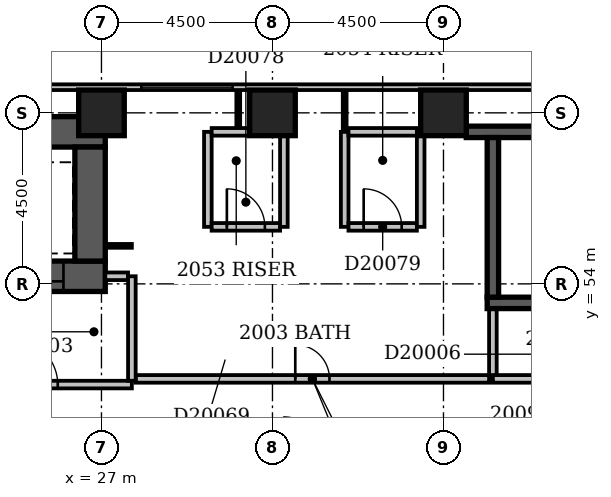
"""IFC4 building model, lengths in metres.
Left out: names, types, materials, properties, quantities, classifications, styles, units other than length and angle.
Written with IfcOpenShell. Run it as: python <this file> out.ifc"""

import sys

from ifc_helpers import new_model, si_unit, direction, frame, frame_2d, origin, origin_2d, place, context, subcontext, project, spatial, rectangle, extrude, element, fill, save


model = new_model("IFC4")
c1 = context("Model", 3, precision=1e-05, world=origin(), true_north=direction((0.0, 1.0)))
c2 = subcontext(c1, "Body", "Model", "MODEL_VIEW")
j1 = project(units=[si_unit("LENGTHUNIT", "METRE"), si_unit("PLANEANGLEUNIT", "RADIAN")], contexts=[c1])
p1 = place(None, origin())
s1 = spatial("IfcSite", under=j1, at=p1, CompositionType="ELEMENT")
p2 = place(p1, origin())
s2 = spatial("IfcBuilding", under=s1, at=p2, CompositionType="ELEMENT")
p3 = place(p2, frame((0.0, 0.0, 83.0)))
s3 = spatial("IfcBuildingStorey", under=s2, at=p3, CompositionType="ELEMENT", Elevation=83.0)
p4 = place(p3, frame((23.8, 54.2, -0.3), z_axis=(0.0, 0.0, 1.0), x_axis=(1.0, 0.0, 0.0)))
e1 = element("IfcWall", 1, at=p4, inside=s3, PredefinedType="SHEAR", context=c2, shape_type="SweptSolid", body=[
    extrude(rectangle(XDim=3.3, YDim=0.8, at=frame_2d((1.65, 0.0))), origin(), (0.0, 0.0, 1.0), 3.6),
])
p5 = place(p4, frame((1.1, 0.0, 0.3)))
e2 = element("IfcOpeningElement", 2, at=p5, cuts=e1, PredefinedType="OPENING", context=c2, shape_type="SweptSolid", body=[
    extrude(rectangle(XDim=1.1, YDim=2.1, at=frame_2d((0.55, 1.05))), frame((0.0, 0.412, 0.0), z_axis=(0.0, -1.0, 0.0), x_axis=(1.0, 0.0, 0.0)), (0.0, 0.0, 1.0), 0.824),
])
p6 = place(p3, frame((23.8, 58.0, -0.3), z_axis=(0.0, 0.0, 1.0), x_axis=(1.0, 0.0, 0.0)))
e3 = element("IfcWall", 3, at=p6, inside=s3, PredefinedType="SHEAR", context=c2, shape_type="SweptSolid", body=[
    extrude(rectangle(XDim=3.3, YDim=0.8, at=frame_2d((1.65, 0.0))), origin(), (0.0, 0.0, 1.0), 3.6),
])
p7 = place(p3, frame((26.7, 54.6, -0.3), z_axis=(0.0, 0.0, 1.0), x_axis=(0.0, 1.0, 0.0)))
e4 = element("IfcWall", 4, at=p7, inside=s3, PredefinedType="SHEAR", context=c2, shape_type="SweptSolid", body=[
    extrude(rectangle(XDim=3.0, YDim=0.8, at=frame_2d((1.5, 0.0))), origin(), (0.0, 0.0, 1.0), 3.6),
])
p8 = place(p3, frame((36.6, 58.0, -0.3), z_axis=(0.0, 0.0, 1.0), x_axis=(1.0, 0.0, 0.0)))
e5 = element("IfcWall", 5, at=p8, inside=s3, PredefinedType="SHEAR", context=c2, shape_type="SweptSolid", body=[
    extrude(rectangle(XDim=7.8, YDim=0.3, at=frame_2d((3.9, 0.0))), origin(), (0.0, 0.0, 1.0), 3.6),
])
p9 = place(p3, frame((37.15, 53.5, -0.3), z_axis=(0.0, 0.0, 1.0), x_axis=(1.0, 0.0, 0.0)))
e6 = element("IfcWall", 6, at=p9, inside=s3, PredefinedType="SHEAR", context=c2, shape_type="SweptSolid", body=[
    extrude(rectangle(XDim=7.0, YDim=0.3, at=frame_2d((3.5, 0.0))), origin(), (0.0, 0.0, 1.0), 3.6),
])
p10 = place(p9, frame((5.58, 0.0, 0.3)))
e7 = element("IfcOpeningElement", 7, at=p10, cuts=e6, PredefinedType="OPENING", context=c2, shape_type="SweptSolid", body=[
    extrude(rectangle(XDim=1.1, YDim=2.1, at=frame_2d((0.55, 1.05))), frame((0.0, 0.162, 0.0), z_axis=(0.0, -1.0, 0.0), x_axis=(1.0, 0.0, 0.0)), (0.0, 0.0, 1.0), 0.324),
])
p11 = place(p3, frame((37.3, 53.65, -0.3), z_axis=(0.0, 0.0, 1.0), x_axis=(0.0, 1.0, 0.0)))
e8 = element("IfcWall", 8, at=p11, inside=s3, PredefinedType="SHEAR", context=c2, shape_type="SweptSolid", body=[
    extrude(rectangle(XDim=4.2, YDim=0.3, at=frame_2d((2.1, 0.0))), origin(), (0.0, 0.0, 1.0), 3.6),
])
for number, where, z_axis, x_axis in (
    (9, (27.0, 58.5, -0.3), (0.0, 0.0, 1.0), (1.0, 0.0, 0.0)),
    (10, (31.5, 58.5, -0.3), (0.0, 0.0, 1.0), (1.0, 0.0, 0.0)),
    (11, (36.0, 58.5, -0.3), (0.0, 0.0, 1.0), (1.0, 0.0, 0.0)),
):
    element("IfcColumn", number, at=place(p3, frame(where, z_axis=z_axis, x_axis=x_axis)), inside=s3, PredefinedType="COLUMN", context=c2, shape_type="SweptSolid", body=[
        extrude(rectangle(XDim=1.2, YDim=1.2, at=origin_2d()), origin(), (0.0, 0.0, 1.0), 3.6),
    ])
p12 = place(p3, frame((68.1, 59.175, 0.0), z_axis=(0.0, 0.0, 1.0), x_axis=(-1.0, 0.0, 0.0)))
e12 = element("IfcWall", 12, at=p12, inside=s3, PredefinedType="STANDARD", context=c2, shape_type="SweptSolid", body=[
    extrude(rectangle(XDim=68.85, YDim=0.15, at=frame_2d((34.425, 0.0))), origin(), (0.0, 0.0, 1.0), 2.7),
])
p13 = place(p12, frame((37.65, 0.0, 0.6)))
e13 = element("IfcOpeningElement", 13, at=p13, cuts=e12, PredefinedType="OPENING", context=c2, shape_type="SweptSolid", body=[
    extrude(rectangle(XDim=2.4, YDim=1.8, at=frame_2d((1.2, 0.9))), frame((0.0, 0.087, 0.0), z_axis=(0.0, -1.0, 0.0), x_axis=(1.0, 0.0, 0.0)), (0.0, 0.0, 1.0), 0.174),
])
p14 = place(p3, frame((23.0, 51.35, 0.0), z_axis=(0.0, 0.0, 1.0), x_axis=(1.0, 0.0, 0.0)))
e14 = element("IfcWall", 14, at=p14, inside=s3, PredefinedType="PARTITIONING", context=c2, shape_type="SweptSolid", body=[
    extrude(rectangle(XDim=4.8, YDim=0.2, at=frame_2d((2.4, 0.0))), origin(), (0.0, 0.0, 1.0), 3.3),
])
p15 = place(p14, frame((1.65, 0.0, 0.0)))
e15 = element("IfcOpeningElement", 15, at=p15, cuts=e14, PredefinedType="OPENING", context=c2, shape_type="SweptSolid", body=[
    extrude(rectangle(XDim=1.2, YDim=2.1, at=frame_2d((0.6, 1.05))), frame((0.0, 0.112, 0.0), z_axis=(0.0, -1.0, 0.0), x_axis=(1.0, 0.0, 0.0)), (0.0, 0.0, 1.0), 0.224),
])
p16 = place(p3, frame((27.8, 51.45, 0.0), z_axis=(0.0, 0.0, 1.0), x_axis=(0.0, 1.0, 0.0)))
e16 = element("IfcWall", 16, at=p16, inside=s3, PredefinedType="PARTITIONING", context=c2, shape_type="SweptSolid", body=[
    extrude(rectangle(XDim=2.75, YDim=0.2, at=frame_2d((1.375, 0.0))), origin(), (0.0, 0.0, 1.0), 3.3),
])
p17 = place(p3, frame((27.1, 54.2, 0.0), z_axis=(0.0, 0.0, 1.0), x_axis=(1.0, 0.0, 0.0)))
e17 = element("IfcWall", 17, at=p17, inside=s3, PredefinedType="PARTITIONING", context=c2, shape_type="SweptSolid", body=[
    extrude(rectangle(XDim=0.6, YDim=0.2, at=frame_2d((0.3, 0.0))), origin(), (0.0, 0.0, 1.0), 3.3),
])
p18 = place(p3, frame((37.3, 51.5, 0.0), z_axis=(0.0, 0.0, 1.0), x_axis=(1.0, 0.0, 0.0)))
e18 = element("IfcWall", 18, at=p18, inside=s3, PredefinedType="PARTITIONING", context=c2, shape_type="SweptSolid", body=[
    extrude(rectangle(XDim=6.7, YDim=0.2, at=frame_2d((3.35, 0.0))), origin(), (0.0, 0.0, 1.0), 3.3),
])
p19 = place(p18, frame((2.75, 0.0, 0.0)))
e19 = element("IfcOpeningElement", 19, at=p19, cuts=e18, PredefinedType="OPENING", context=c2, shape_type="SweptSolid", body=[
    extrude(rectangle(XDim=1.2, YDim=2.1, at=frame_2d((0.6, 1.05))), frame((0.0, 0.112, 0.0), z_axis=(0.0, -1.0, 0.0), x_axis=(1.0, 0.0, 0.0)), (0.0, 0.0, 1.0), 0.224),
])
p20 = place(p3, frame((37.3, 51.6, 0.0), z_axis=(0.0, 0.0, 1.0), x_axis=(0.0, 1.0, 0.0)))
e20 = element("IfcWall", 20, at=p20, inside=s3, PredefinedType="PARTITIONING", context=c2, shape_type="SweptSolid", body=[
    extrude(rectangle(XDim=1.73, YDim=0.2, at=frame_2d((0.865, 0.0))), origin(), (0.0, 0.0, 1.0), 3.3),
])
p21 = place(p3, frame((27.9, 51.5, 0.0), z_axis=(0.0, 0.0, 1.0), x_axis=(1.0, 0.0, 0.0)))
e21 = element("IfcWall", 21, at=p21, inside=s3, PredefinedType="PARTITIONING", context=c2, shape_type="SweptSolid", body=[
    extrude(rectangle(XDim=9.3, YDim=0.2, at=frame_2d((4.65, 0.0))), origin(), (0.0, 0.0, 1.0), 3.3),
])
p22 = place(p21, frame((4.2, 0.0, 0.0)))
e22 = element("IfcOpeningElement", 22, at=p22, cuts=e21, PredefinedType="OPENING", context=c2, shape_type="SweptSolid", body=[
    extrude(rectangle(XDim=0.9, YDim=2.1, at=frame_2d((0.45, 1.05))), frame((0.0, 0.112, 0.0), z_axis=(0.0, -1.0, 0.0), x_axis=(1.0, 0.0, 0.0)), (0.0, 0.0, 1.0), 0.224),
])
p23 = place(p3, frame((27.1, 55.0, 0.0), z_axis=(0.0, 0.0, 1.0), x_axis=(1.0, 0.0, 0.0)))
e23 = element("IfcWall", 23, at=p23, inside=s3, PredefinedType="PARTITIONING", context=c2, shape_type="SweptSolid", body=[
    extrude(rectangle(XDim=0.7, YDim=0.1, at=frame_2d((0.35, 0.0))), origin(), (0.0, 0.0, 1.0), 3.3),
])
p24 = place(p3, frame((29.8, 55.5, 0.0), z_axis=(0.0, 0.0, 1.0), x_axis=(0.0, 1.0, 0.0)))
e24 = element("IfcWall", 24, at=p24, inside=s3, PredefinedType="PARTITIONING", context=c2, shape_type="SweptSolid", body=[
    extrude(rectangle(XDim=2.5, YDim=0.2, at=frame_2d((1.25, 0.0))), origin(), (0.0, 0.0, 1.0), 3.3),
])
p25 = place(p3, frame((29.9, 55.5, 0.0), z_axis=(0.0, 0.0, 1.0), x_axis=(1.0, 0.0, 0.0)))
e25 = element("IfcWall", 25, at=p25, inside=s3, PredefinedType="PARTITIONING", context=c2, shape_type="SweptSolid", body=[
    extrude(rectangle(XDim=1.8, YDim=0.2, at=frame_2d((0.9, 0.0))), origin(), (0.0, 0.0, 1.0), 3.3),
])
p26 = place(p25, frame((0.4, 0.0, 0.0)))
e26 = element("IfcOpeningElement", 26, at=p26, cuts=e25, PredefinedType="OPENING", context=c2, shape_type="SweptSolid", body=[
    extrude(rectangle(XDim=1.0, YDim=2.1, at=frame_2d((0.5, 1.05))), frame((0.0, 0.112, 0.0), z_axis=(0.0, -1.0, 0.0), x_axis=(1.0, 0.0, 0.0)), (0.0, 0.0, 1.0), 0.224),
])
for number, where, z_axis, x_axis in (
    (27, (31.8, 55.5, 0.0), (0.0, 0.0, 1.0), (0.0, 1.0, 0.0)),
    (28, (33.4, 55.5, 0.0), (0.0, 0.0, 1.0), (0.0, 1.0, 0.0)),
):
    element("IfcWall", number, at=place(p3, frame(where, z_axis=z_axis, x_axis=x_axis)), inside=s3, PredefinedType="PARTITIONING", context=c2, shape_type="SweptSolid", body=[
        extrude(rectangle(XDim=2.5, YDim=0.2, at=frame_2d((1.25, 0.0))), origin(), (0.0, 0.0, 1.0), 3.3),
    ])
p27 = place(p3, frame((33.5, 55.5, 0.0), z_axis=(0.0, 0.0, 1.0), x_axis=(1.0, 0.0, 0.0)))
e29 = element("IfcWall", 29, at=p27, inside=s3, PredefinedType="PARTITIONING", context=c2, shape_type="SweptSolid", body=[
    extrude(rectangle(XDim=1.8, YDim=0.2, at=frame_2d((0.9, 0.0))), origin(), (0.0, 0.0, 1.0), 3.3),
])
p28 = place(p27, frame((0.4, 0.0, 0.0)))
e30 = element("IfcOpeningElement", 30, at=p28, cuts=e29, PredefinedType="OPENING", context=c2, shape_type="SweptSolid", body=[
    extrude(rectangle(XDim=1.0, YDim=2.1, at=frame_2d((0.5, 1.05))), frame((0.0, 0.112, 0.0), z_axis=(0.0, -1.0, 0.0), x_axis=(1.0, 0.0, 0.0)), (0.0, 0.0, 1.0), 0.224),
])
p29 = place(p3, frame((35.4, 55.5, 0.0), z_axis=(0.0, 0.0, 1.0), x_axis=(0.0, 1.0, 0.0)))
e31 = element("IfcWall", 31, at=p29, inside=s3, PredefinedType="PARTITIONING", context=c2, shape_type="SweptSolid", body=[
    extrude(rectangle(XDim=2.5, YDim=0.2, at=frame_2d((1.25, 0.0))), origin(), (0.0, 0.0, 1.0), 2.4),
])
p30 = place(p3, frame((29.9, 58.0, 0.0), z_axis=(0.0, 0.0, 1.0), x_axis=(1.0, 0.0, 0.0)))
e32 = element("IfcWall", 32, at=p30, inside=s3, PredefinedType="PARTITIONING", context=c2, shape_type="SweptSolid", body=[
    extrude(rectangle(XDim=1.8, YDim=0.2, at=frame_2d((0.9, 0.0))), origin(), (0.0, 0.0, 1.0), 3.3),
])
p31 = place(p3, frame((33.4, 58.0, 0.0), z_axis=(0.0, 0.0, 1.0), x_axis=(0.0, 1.0, 0.0)))
e33 = element("IfcWall", 33, at=p31, inside=s3, PredefinedType="PARTITIONING", context=c2, shape_type="SweptSolid", body=[
    extrude(rectangle(XDim=1.1, YDim=0.1, at=frame_2d((0.55, 0.0))), origin(), (0.0, 0.0, 1.0), 3.3),
])
p32 = place(p3, frame((33.5, 58.0, 0.0), z_axis=(0.0, 0.0, 1.0), x_axis=(1.0, 0.0, 0.0)))
e34 = element("IfcWall", 34, at=p32, inside=s3, PredefinedType="PARTITIONING", context=c2, shape_type="SweptSolid", body=[
    extrude(rectangle(XDim=1.8, YDim=0.2, at=frame_2d((0.9, 0.0))), origin(), (0.0, 0.0, 1.0), 3.3),
])
p33 = place(p3, frame((30.6, 58.1, 0.0), z_axis=(0.0, 0.0, 1.0), x_axis=(0.0, 1.0, 0.0)))
e35 = element("IfcWall", 35, at=p33, inside=s3, PredefinedType="PARTITIONING", context=c2, shape_type="SweptSolid", body=[
    extrude(rectangle(XDim=1.0, YDim=0.1, at=frame_2d((0.5, 0.0))), origin(), (0.0, 0.0, 1.0), 3.3),
])
p34 = place(p13, origin())
e36 = element("IfcWindow", 36, at=p34, inside=s3, PartitioningType="SINGLE_PANEL", PredefinedType="WINDOW", context=c2, shape_type="SweptSolid", body=[
    extrude(rectangle(XDim=2.4, YDim=1.8, at=frame_2d((1.2, 0.9))), frame((0.0, 0.03, 0.0), z_axis=(0.0, -1.0, 0.0), x_axis=(1.0, 0.0, 0.0)), (0.0, 0.0, 1.0), 0.06),
])
fill(e13, e36)
p35 = place(p15, origin())
e37 = element("IfcDoor", 37, at=p35, inside=s3, OperationType="SINGLE_SWING_LEFT", PredefinedType="DOOR", context=c2, shape_type="SweptSolid", body=[
    extrude(rectangle(XDim=1.2, YDim=2.1, at=frame_2d((0.6, 1.05))), frame((0.0, 0.025, 0.0), z_axis=(0.0, -1.0, 0.0), x_axis=(1.0, 0.0, 0.0)), (0.0, 0.0, 1.0), 0.05),
])
fill(e15, e37)
p36 = place(p5, origin())
e38 = element("IfcDoor", 38, at=p36, inside=s3, OperationType="SLIDING_TO_LEFT", PredefinedType="DOOR", context=c2, shape_type="SweptSolid", body=[
    extrude(rectangle(XDim=1.1, YDim=2.1, at=frame_2d((0.55, 1.05))), frame((0.0, 0.025, 0.0), z_axis=(0.0, -1.0, 0.0), x_axis=(1.0, 0.0, 0.0)), (0.0, 0.0, 1.0), 0.05),
])
fill(e2, e38)
p37 = place(p22, origin())
e39 = element("IfcDoor", 39, at=p37, inside=s3, OperationType="SINGLE_SWING_LEFT", PredefinedType="DOOR", context=c2, shape_type="SweptSolid", body=[
    extrude(rectangle(XDim=0.9, YDim=2.1, at=frame_2d((0.45, 1.05))), frame((0.0, 0.025, 0.0), z_axis=(0.0, -1.0, 0.0), x_axis=(1.0, 0.0, 0.0)), (0.0, 0.0, 1.0), 0.05),
])
fill(e22, e39)
p38 = place(p26, origin())
e40 = element("IfcDoor", 40, at=p38, inside=s3, OperationType="SINGLE_SWING_LEFT", PredefinedType="DOOR", context=c2, shape_type="SweptSolid", body=[
    extrude(rectangle(XDim=1.0, YDim=2.1, at=frame_2d((0.5, 1.05))), frame((0.0, 0.025, 0.0), z_axis=(0.0, -1.0, 0.0), x_axis=(1.0, 0.0, 0.0)), (0.0, 0.0, 1.0), 0.05),
])
fill(e26, e40)
p39 = place(p28, origin())
e41 = element("IfcDoor", 41, at=p39, inside=s3, OperationType="SINGLE_SWING_LEFT", PredefinedType="DOOR", context=c2, shape_type="SweptSolid", body=[
    extrude(rectangle(XDim=1.0, YDim=2.1, at=frame_2d((0.5, 1.05))), frame((0.0, 0.025, 0.0), z_axis=(0.0, -1.0, 0.0), x_axis=(1.0, 0.0, 0.0)), (0.0, 0.0, 1.0), 0.05),
])
fill(e30, e41)
save(model, sys.argv[1])
